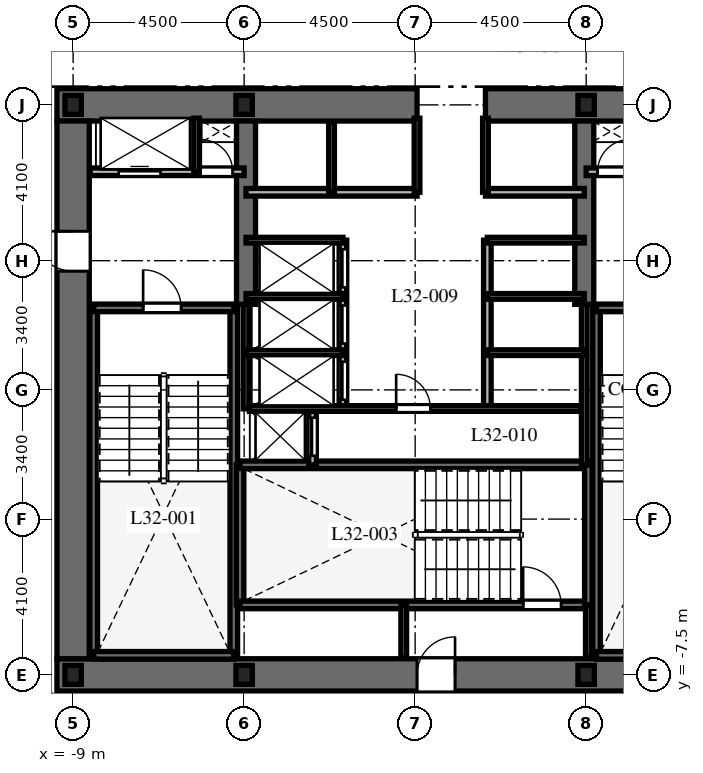
"""IFC4 building model, lengths in metres.
Left out: names, types, materials, properties, quantities, classifications, styles, units other than length and angle.
Written with IfcOpenShell. Run it as: python <this file> out.ifc"""

import sys

from ifc_helpers import new_model, si_unit, direction, frame, frame_2d, origin, origin_2d, place, context, subcontext, project, spatial, rectangle, i_section, extrude, element, fill, save


model = new_model("IFC4")
c1 = context("Model", 3, precision=1e-05, world=origin(), true_north=direction((0.0, 1.0)))
c2 = subcontext(c1, "Body", "Model", "MODEL_VIEW")
j1 = project(units=[si_unit("LENGTHUNIT", "METRE"), si_unit("PLANEANGLEUNIT", "RADIAN")], contexts=[c1])
p1 = place(None, origin())
s1 = spatial("IfcSite", under=j1, at=p1, CompositionType="ELEMENT")
p2 = place(p1, origin())
s2 = spatial("IfcBuilding", under=s1, at=p2, CompositionType="ELEMENT")
p3 = place(p2, frame((0.0, 0.0, 132.1)))
s3 = spatial("IfcBuildingStorey", under=s2, at=p3, CompositionType="ELEMENT", Elevation=132.1)
p4 = place(p3, frame((-9.425, -7.5, 0.0), z_axis=(0.0, 0.0, 1.0), x_axis=(1.0, 0.0, 0.0)))
e1 = element("IfcWall", 1, at=p4, inside=s3, PredefinedType="SHEAR", context=c2, shape_type="SweptSolid", body=[
    extrude(rectangle(XDim=18.85, YDim=0.85, at=frame_2d((9.425, 0.0))), origin(), (0.0, 0.0, 1.0), 3.7),
])
p5 = place(p4, frame((9.475, 0.0, 0.0)))
e2 = element("IfcOpeningElement", 2, at=p5, cuts=e1, PredefinedType="OPENING", context=c2, shape_type="SweptSolid", body=[
    extrude(rectangle(XDim=1.0, YDim=2.15, at=frame_2d((0.5, 1.075))), frame((0.0, 0.435, 0.0), z_axis=(0.0, -1.0, 0.0), x_axis=(1.0, 0.0, 0.0)), (0.0, 0.0, 1.0), 0.87),
])
p6 = place(p3, frame((-9.425, 7.5, 0.0), z_axis=(0.0, 0.0, 1.0), x_axis=(1.0, 0.0, 0.0)))
e3 = element("IfcWall", 3, at=p6, inside=s3, PredefinedType="SHEAR", context=c2, shape_type="SweptSolid", body=[
    extrude(rectangle(XDim=9.475, YDim=0.85, at=frame_2d((4.738, 0.0))), origin(), (0.0, 0.0, 1.0), 3.7),
])
p7 = place(p3, frame((1.85, 7.5, 0.0), z_axis=(0.0, 0.0, 1.0), x_axis=(1.0, 0.0, 0.0)))
e4 = element("IfcWall", 4, at=p7, inside=s3, PredefinedType="SHEAR", context=c2, shape_type="SweptSolid", body=[
    extrude(rectangle(XDim=7.575, YDim=0.85, at=frame_2d((3.788, 0.0))), origin(), (0.0, 0.0, 1.0), 3.7),
])
p8 = place(p3, frame((-9.0, -7.075, 0.0), z_axis=(0.0, 0.0, 1.0), x_axis=(0.0, 1.0, 0.0)))
e5 = element("IfcWall", 5, at=p8, inside=s3, PredefinedType="SHEAR", context=c2, shape_type="SweptSolid", body=[
    extrude(rectangle(XDim=14.15, YDim=0.85, at=frame_2d((7.075, 0.0))), origin(), (0.0, 0.0, 1.0), 3.7),
])
p9 = place(p8, frame((10.2, 0.0, 0.0)))
e6 = element("IfcOpeningElement", 6, at=p9, cuts=e5, PredefinedType="OPENING", context=c2, shape_type="SweptSolid", body=[
    extrude(rectangle(XDim=1.05, YDim=2.15, at=frame_2d((0.525, 1.075))), frame((0.0, 0.435, 0.0), z_axis=(0.0, -1.0, 0.0), x_axis=(1.0, 0.0, 0.0)), (0.0, 0.0, 1.0), 0.87),
])
for number, where, z_axis, x_axis in (
    (7, (-4.45, 2.25, 0.0), (0.0, 0.0, 1.0), (0.0, 1.0, 0.0)),
    (8, (4.45, 2.25, 0.0), (0.0, 0.0, 1.0), (0.0, 1.0, 0.0)),
):
    element("IfcWall", number, at=place(p3, frame(where, z_axis=z_axis, x_axis=x_axis)), inside=s3, PredefinedType="SHEAR", context=c2, shape_type="SweptSolid", body=[
        extrude(rectangle(XDim=4.825, YDim=0.5, at=frame_2d((2.413, 0.0))), origin(), (0.0, 0.0, 1.0), 3.7),
    ])
for number, where, z_axis, x_axis in (
    (9, (-8.458, -6.985, 0.0), (0.0, 0.0, 1.0), (0.0, 1.0, 0.0)),
    (10, (-4.772, -6.985, 0.0), (0.0, 0.0, 1.0), (0.0, 1.0, 0.0)),
):
    element("IfcWall", number, at=place(p3, frame(where, z_axis=z_axis, x_axis=x_axis)), inside=s3, PredefinedType="SHEAR", context=c2, shape_type="SweptSolid", body=[
        extrude(rectangle(XDim=9.143, YDim=0.2, at=frame_2d((4.572, 0.0))), origin(), (0.0, 0.0, 1.0), 3.7),
    ])
p10 = place(p3, frame((-8.458, -6.985, 0.0), z_axis=(0.0, 0.0, 1.0), x_axis=(1.0, 0.0, 0.0)))
e11 = element("IfcWall", 11, at=p10, inside=s3, PredefinedType="SHEAR", context=c2, shape_type="SweptSolid", body=[
    extrude(rectangle(XDim=3.686, YDim=0.2, at=frame_2d((1.843, 0.0))), origin(), (0.0, 0.0, 1.0), 3.7),
])
p11 = place(p3, frame((-8.458, 2.158, 0.0), z_axis=(0.0, 0.0, 1.0), x_axis=(1.0, 0.0, 0.0)))
e12 = element("IfcWall", 12, at=p11, inside=s3, PredefinedType="SHEAR", context=c2, shape_type="SweptSolid", body=[
    extrude(rectangle(XDim=3.686, YDim=0.2, at=frame_2d((1.843, 0.0))), origin(), (0.0, 0.0, 1.0), 3.7),
])
p12 = place(p11, frame((1.3, 0.0, 0.0)))
e13 = element("IfcOpeningElement", 13, at=p12, cuts=e12, PredefinedType="OPENING", context=c2, shape_type="SweptSolid", body=[
    extrude(rectangle(XDim=1.0, YDim=2.15, at=frame_2d((0.5, 1.075))), frame((0.0, 0.11, 0.0), z_axis=(0.0, -1.0, 0.0), x_axis=(1.0, 0.0, 0.0)), (0.0, 0.0, 1.0), 0.22),
])
p13 = place(p3, frame((4.772, -6.985, 0.0), z_axis=(0.0, 0.0, 1.0), x_axis=(0.0, 1.0, 0.0)))
e14 = element("IfcWall", 14, at=p13, inside=s3, PredefinedType="SHEAR", context=c2, shape_type="SweptSolid", body=[
    extrude(rectangle(XDim=9.143, YDim=0.2, at=frame_2d((4.572, 0.0))), origin(), (0.0, 0.0, 1.0), 3.7),
])
p14 = place(p3, frame((4.772, -6.985, 0.0), z_axis=(0.0, 0.0, 1.0), x_axis=(1.0, 0.0, 0.0)))
e15 = element("IfcWall", 15, at=p14, inside=s3, PredefinedType="SHEAR", context=c2, shape_type="SweptSolid", body=[
    extrude(rectangle(XDim=3.686, YDim=0.2, at=frame_2d((1.843, 0.0))), origin(), (0.0, 0.0, 1.0), 3.7),
])
p15 = place(p3, frame((4.772, 2.158, 0.0), z_axis=(0.0, 0.0, 1.0), x_axis=(1.0, 0.0, 0.0)))
e16 = element("IfcWall", 16, at=p15, inside=s3, PredefinedType="SHEAR", context=c2, shape_type="SweptSolid", body=[
    extrude(rectangle(XDim=3.686, YDim=0.2, at=frame_2d((1.843, 0.0))), origin(), (0.0, 0.0, 1.0), 3.7),
])
p16 = place(p15, frame((1.35, 0.0, 0.0)))
e17 = element("IfcOpeningElement", 17, at=p16, cuts=e16, PredefinedType="OPENING", context=c2, shape_type="SweptSolid", body=[
    extrude(rectangle(XDim=1.0, YDim=2.15, at=frame_2d((0.5, 1.075))), frame((0.0, 0.11, 0.0), z_axis=(0.0, -1.0, 0.0), x_axis=(1.0, 0.0, 0.0)), (0.0, 0.0, 1.0), 0.22),
])
p17 = place(p3, frame((-4.608, -5.658, 0.0), z_axis=(0.0, 0.0, 1.0), x_axis=(0.0, 1.0, 0.0)))
e18 = element("IfcWall", 18, at=p17, inside=s3, PredefinedType="SHEAR", context=c2, shape_type="SweptSolid", body=[
    extrude(rectangle(XDim=3.686, YDim=0.2, at=frame_2d((1.843, 0.0))), origin(), (0.0, 0.0, 1.0), 3.7),
])
p18 = place(p3, frame((-4.608, -5.658, 0.0), z_axis=(0.0, 0.0, 1.0), x_axis=(1.0, 0.0, 0.0)))
e19 = element("IfcWall", 19, at=p18, inside=s3, PredefinedType="SHEAR", context=c2, shape_type="SweptSolid", body=[
    extrude(rectangle(XDim=9.166, YDim=0.2, at=frame_2d((4.583, 0.0))), origin(), (0.0, 0.0, 1.0), 3.7),
])
p19 = place(p18, frame((7.45, 0.0, 0.0)))
e20 = element("IfcOpeningElement", 20, at=p19, cuts=e19, PredefinedType="OPENING", context=c2, shape_type="SweptSolid", body=[
    extrude(rectangle(XDim=1.0, YDim=2.15, at=frame_2d((0.5, 1.075))), frame((0.0, 0.11, 0.0), z_axis=(0.0, -1.0, 0.0), x_axis=(1.0, 0.0, 0.0)), (0.0, 0.0, 1.0), 0.22),
])
p20 = place(p3, frame((-4.608, -1.972, 0.0), z_axis=(0.0, 0.0, 1.0), x_axis=(1.0, 0.0, 0.0)))
e21 = element("IfcWall", 21, at=p20, inside=s3, PredefinedType="SHEAR", context=c2, shape_type="SweptSolid", body=[
    extrude(rectangle(XDim=9.166, YDim=0.2, at=frame_2d((4.583, 0.0))), origin(), (0.0, 0.0, 1.0), 3.7),
])
p21 = place(p3, frame((4.558, -5.658, 0.0), z_axis=(0.0, 0.0, 1.0), x_axis=(0.0, 1.0, 0.0)))
e22 = element("IfcWall", 22, at=p21, inside=s3, PredefinedType="SHEAR", context=c2, shape_type="SweptSolid", body=[
    extrude(rectangle(XDim=3.686, YDim=0.2, at=frame_2d((1.843, 0.0))), origin(), (0.0, 0.0, 1.0), 3.7),
])
for number, where, z_axis, x_axis in (
    (23, (-9.0, -7.5, 0.0), (0.0, 0.0, 1.0), (1.0, 0.0, 0.0)),
    (24, (-4.5, -7.5, 0.0), (0.0, 0.0, 1.0), (1.0, 0.0, 0.0)),
    (25, (4.5, -7.5, 0.0), (0.0, 0.0, 1.0), (1.0, 0.0, 0.0)),
    (26, (4.5, 7.5, 0.0), (0.0, 0.0, 1.0), (1.0, 0.0, 0.0)),
    (27, (-4.5, 7.5, 0.0), (0.0, 0.0, 1.0), (1.0, 0.0, 0.0)),
    (28, (-9.0, 7.5, 0.0), (0.0, 0.0, 1.0), (1.0, 0.0, 0.0)),
):
    element("IfcColumn", number, at=place(p3, frame(where, z_axis=z_axis, x_axis=x_axis)), inside=s3, PredefinedType="COLUMN", context=c2, shape_type="SweptSolid", body=[
        extrude(i_section(OverallWidth=0.432, OverallDepth=0.498, WebThickness=0.056, FlangeThickness=0.089, at=origin_2d()), origin(), (0.0, 0.0, 1.0), 3.7),
    ])
for number, where, z_axis, x_axis in (
    (29, (-0.3, -7.02, 0.0), (0.0, 0.0, 1.0), (0.0, 1.0, 0.0)),
    (30, (4.558, -7.02, 0.0), (0.0, 0.0, 1.0), (0.0, 1.0, 0.0)),
):
    element("IfcWall", number, at=place(p3, frame(where, z_axis=z_axis, x_axis=x_axis)), inside=s3, PredefinedType="PARTITIONING", context=c2, shape_type="SweptSolid", body=[
        extrude(rectangle(XDim=1.362, YDim=0.15, at=frame_2d((0.681, 0.0))), origin(), (0.0, 0.0, 1.0), 3.4),
    ])
p22 = place(p3, frame((-8.55, 5.74, 0.0), z_axis=(0.0, 0.0, 1.0), x_axis=(1.0, 0.0, 0.0)))
e31 = element("IfcWall", 31, at=p22, inside=s3, PredefinedType="PARTITIONING", context=c2, shape_type="SweptSolid", body=[
    extrude(rectangle(XDim=4.05, YDim=0.2, at=frame_2d((2.025, 0.0))), origin(), (0.0, 0.0, 1.0), 3.4),
])
p23 = place(p22, frame((0.75, 0.0, 0.0)))
e32 = element("IfcOpeningElement", 32, at=p23, cuts=e31, PredefinedType="OPENING", context=c2, shape_type="SweptSolid", body=[
    extrude(rectangle(XDim=1.1, YDim=2.2, at=frame_2d((0.55, 1.1))), frame((0.0, 0.11, 0.0), z_axis=(0.0, -1.0, 0.0), x_axis=(1.0, 0.0, 0.0)), (0.0, 0.0, 1.0), 0.22),
])
p24 = place(p22, frame((2.9, 0.0, 0.0)))
e33 = element("IfcOpeningElement", 33, at=p24, cuts=e31, PredefinedType="OPENING", context=c2, shape_type="SweptSolid", body=[
    extrude(rectangle(XDim=0.85, YDim=2.03, at=frame_2d((0.425, 1.015))), frame((0.0, 0.11, 0.0), z_axis=(0.0, -1.0, 0.0), x_axis=(1.0, 0.0, 0.0)), (0.0, 0.0, 1.0), 0.22),
])
p25 = place(p3, frame((-5.75, 5.74, 0.0), z_axis=(0.0, 0.0, 1.0), x_axis=(0.0, 1.0, 0.0)))
e34 = element("IfcWall", 34, at=p25, inside=s3, PredefinedType="PARTITIONING", context=c2, shape_type="SweptSolid", body=[
    extrude(rectangle(XDim=1.41, YDim=0.15, at=frame_2d((0.705, 0.0))), origin(), (0.0, 0.0, 1.0), 3.4),
])
p26 = place(p3, frame((4.5, 5.74, 0.0), z_axis=(0.0, 0.0, 1.0), x_axis=(1.0, 0.0, 0.0)))
e35 = element("IfcWall", 35, at=p26, inside=s3, PredefinedType="PARTITIONING", context=c2, shape_type="SweptSolid", body=[
    extrude(rectangle(XDim=4.05, YDim=0.2, at=frame_2d((2.025, 0.0))), origin(), (0.0, 0.0, 1.0), 3.4),
])
p27 = place(p26, frame((0.3, 0.0, 0.0)))
e36 = element("IfcOpeningElement", 36, at=p27, cuts=e35, PredefinedType="OPENING", context=c2, shape_type="SweptSolid", body=[
    extrude(rectangle(XDim=0.85, YDim=2.03, at=frame_2d((0.425, 1.015))), frame((0.0, 0.11, 0.0), z_axis=(0.0, -1.0, 0.0), x_axis=(1.0, 0.0, 0.0)), (0.0, 0.0, 1.0), 0.22),
])
p28 = place(p26, frame((2.15, 0.0, 0.0)))
e37 = element("IfcOpeningElement", 37, at=p28, cuts=e35, PredefinedType="OPENING", context=c2, shape_type="SweptSolid", body=[
    extrude(rectangle(XDim=1.1, YDim=2.2, at=frame_2d((0.55, 1.1))), frame((0.0, 0.11, 0.0), z_axis=(0.0, -1.0, 0.0), x_axis=(1.0, 0.0, 0.0)), (0.0, 0.0, 1.0), 0.22),
])
p29 = place(p3, frame((-2.7, -1.972, 0.0), z_axis=(0.0, 0.0, 1.0), x_axis=(0.0, 1.0, 0.0)))
e38 = element("IfcWall", 38, at=p29, inside=s3, PredefinedType="PARTITIONING", context=c2, shape_type="SweptSolid", body=[
    extrude(rectangle(XDim=1.472, YDim=0.2, at=frame_2d((0.736, 0.0))), origin(), (0.0, 0.0, 1.0), 3.4),
])
p30 = place(p29, frame((0.24, 0.0, 0.0)))
e39 = element("IfcOpeningElement", 39, at=p30, cuts=e38, PredefinedType="OPENING", context=c2, shape_type="SweptSolid", body=[
    extrude(rectangle(XDim=1.0, YDim=2.2, at=frame_2d((0.5, 1.1))), frame((0.0, 0.11, 0.0), z_axis=(0.0, -1.0, 0.0), x_axis=(1.0, 0.0, 0.0)), (0.0, 0.0, 1.0), 0.22),
])
p31 = place(p3, frame((-4.45, 5.2, 0.0), z_axis=(0.0, 0.0, 1.0), x_axis=(1.0, 0.0, 0.0)))
e40 = element("IfcWall", 40, at=p31, inside=s3, PredefinedType="PARTITIONING", context=c2, shape_type="SweptSolid", body=[
    extrude(rectangle(XDim=4.5, YDim=0.2, at=frame_2d((2.25, 0.0))), origin(), (0.0, 0.0, 1.0), 3.4),
])
p32 = place(p3, frame((1.85, 5.2, 0.0), z_axis=(0.0, 0.0, 1.0), x_axis=(1.0, 0.0, 0.0)))
e41 = element("IfcWall", 41, at=p32, inside=s3, PredefinedType="PARTITIONING", context=c2, shape_type="SweptSolid", body=[
    extrude(rectangle(XDim=2.6, YDim=0.2, at=frame_2d((1.3, 0.0))), origin(), (0.0, 0.0, 1.0), 3.4),
])
p33 = place(p3, frame((-2.2, 5.2, 0.0), z_axis=(0.0, 0.0, 1.0), x_axis=(0.0, 1.0, 0.0)))
e42 = element("IfcWall", 42, at=p33, inside=s3, PredefinedType="PARTITIONING", context=c2, shape_type="SweptSolid", body=[
    extrude(rectangle(XDim=1.85, YDim=0.15, at=frame_2d((0.925, 0.0))), origin(), (0.0, 0.0, 1.0), 3.4),
])
for number, where, z_axis, x_axis in (
    (43, (0.05, 5.2, 0.0), (0.0, 0.0, 1.0), (0.0, 1.0, 0.0)),
    (44, (1.85, 5.2, 0.0), (0.0, 0.0, 1.0), (0.0, 1.0, 0.0)),
):
    element("IfcWall", number, at=place(p3, frame(where, z_axis=z_axis, x_axis=x_axis)), inside=s3, PredefinedType="PARTITIONING", context=c2, shape_type="SweptSolid", body=[
        extrude(rectangle(XDim=1.95, YDim=0.15, at=frame_2d((0.975, 0.0))), origin(), (0.0, 0.0, 1.0), 3.4),
    ])
p34 = place(p3, frame((-4.45, -0.5, 0.0), z_axis=(0.0, 0.0, 1.0), x_axis=(0.0, 1.0, 0.0)))
e45 = element("IfcWall", 45, at=p34, inside=s3, PredefinedType="PARTITIONING", context=c2, shape_type="SweptSolid", body=[
    extrude(rectangle(XDim=2.75, YDim=0.15, at=frame_2d((1.375, 0.0))), origin(), (0.0, 0.0, 1.0), 3.4),
])
p35 = place(p3, frame((4.45, -1.972, 0.0), z_axis=(0.0, 0.0, 1.0), x_axis=(0.0, 1.0, 0.0)))
e46 = element("IfcWall", 46, at=p35, inside=s3, PredefinedType="PARTITIONING", context=c2, shape_type="SweptSolid", body=[
    extrude(rectangle(XDim=4.222, YDim=0.15, at=frame_2d((2.111, 0.0))), origin(), (0.0, 0.0, 1.0), 3.4),
])
p36 = place(p3, frame((-1.9, -0.5, 0.0), z_axis=(0.0, 0.0, 1.0), x_axis=(0.0, 1.0, 0.0)))
e47 = element("IfcWall", 47, at=p36, inside=s3, PredefinedType="PARTITIONING", context=c2, shape_type="SweptSolid", body=[
    extrude(rectangle(XDim=4.44, YDim=0.2, at=frame_2d((2.22, 0.0))), origin(), (0.0, 0.0, 1.0), 3.4),
])
p37 = place(p36, frame((0.24, 0.0, 0.0)))
e48 = element("IfcOpeningElement", 48, at=p37, cuts=e47, PredefinedType="OPENING", context=c2, shape_type="SweptSolid", body=[
    extrude(rectangle(XDim=1.0, YDim=2.2, at=frame_2d((0.5, 1.1))), frame((0.0, 0.11, 0.0), z_axis=(0.0, -1.0, 0.0), x_axis=(1.0, 0.0, 0.0)), (0.0, 0.0, 1.0), 0.22),
])
p38 = place(p36, frame((1.72, 0.0, 0.0)))
e49 = element("IfcOpeningElement", 49, at=p38, cuts=e47, PredefinedType="OPENING", context=c2, shape_type="SweptSolid", body=[
    extrude(rectangle(XDim=1.0, YDim=2.2, at=frame_2d((0.5, 1.1))), frame((0.0, 0.11, 0.0), z_axis=(0.0, -1.0, 0.0), x_axis=(1.0, 0.0, 0.0)), (0.0, 0.0, 1.0), 0.22),
])
p39 = place(p36, frame((3.2, 0.0, 0.0)))
e50 = element("IfcOpeningElement", 50, at=p39, cuts=e47, PredefinedType="OPENING", context=c2, shape_type="SweptSolid", body=[
    extrude(rectangle(XDim=1.0, YDim=2.2, at=frame_2d((0.5, 1.1))), frame((0.0, 0.11, 0.0), z_axis=(0.0, -1.0, 0.0), x_axis=(1.0, 0.0, 0.0)), (0.0, 0.0, 1.0), 0.22),
])
for number, where, z_axis, x_axis in (
    (51, (-4.45, 3.94, 0.0), (0.0, 0.0, 1.0), (1.0, 0.0, 0.0)),
    (52, (-4.45, 0.98, 0.0), (0.0, 0.0, 1.0), (1.0, 0.0, 0.0)),
    (53, (-4.45, 2.46, 0.0), (0.0, 0.0, 1.0), (1.0, 0.0, 0.0)),
):
    element("IfcWall", number, at=place(p3, frame(where, z_axis=z_axis, x_axis=x_axis)), inside=s3, PredefinedType="PARTITIONING", context=c2, shape_type="SweptSolid", body=[
        extrude(rectangle(XDim=2.55, YDim=0.15, at=frame_2d((1.275, 0.0))), origin(), (0.0, 0.0, 1.0), 3.4),
    ])
p40 = place(p3, frame((1.9, -0.5, 0.0), z_axis=(0.0, 0.0, 1.0), x_axis=(0.0, 1.0, 0.0)))
e54 = element("IfcWall", 54, at=p40, inside=s3, PredefinedType="PARTITIONING", context=c2, shape_type="SweptSolid", body=[
    extrude(rectangle(XDim=4.44, YDim=0.2, at=frame_2d((2.22, 0.0))), origin(), (0.0, 0.0, 1.0), 3.4),
])
for number, where, z_axis, x_axis in (
    (55, (1.9, 3.94, 0.0), (0.0, 0.0, 1.0), (1.0, 0.0, 0.0)),
    (56, (1.9, 0.98, 0.0), (0.0, 0.0, 1.0), (1.0, 0.0, 0.0)),
    (57, (1.9, 2.46, 0.0), (0.0, 0.0, 1.0), (1.0, 0.0, 0.0)),
):
    element("IfcWall", number, at=place(p3, frame(where, z_axis=z_axis, x_axis=x_axis)), inside=s3, PredefinedType="PARTITIONING", context=c2, shape_type="SweptSolid", body=[
        extrude(rectangle(XDim=2.55, YDim=0.15, at=frame_2d((1.275, 0.0))), origin(), (0.0, 0.0, 1.0), 3.4),
    ])
p41 = place(p3, frame((-4.36, -0.49, 0.0), z_axis=(0.0, 0.0, 1.0), x_axis=(1.0, 0.0, 0.0)))
e58 = element("IfcWall", 58, at=p41, inside=s3, PredefinedType="PARTITIONING", context=c2, shape_type="SweptSolid", body=[
    extrude(rectangle(XDim=8.72, YDim=0.15, at=frame_2d((4.36, 0.0))), origin(), (0.0, 0.0, 1.0), 3.4),
])
p42 = place(p41, frame((3.86, 0.0, 0.0)))
e59 = element("IfcOpeningElement", 59, at=p42, cuts=e58, PredefinedType="OPENING", context=c2, shape_type="SweptSolid", body=[
    extrude(rectangle(XDim=0.9, YDim=2.03, at=frame_2d((0.45, 1.015))), frame((0.0, 0.085, 0.0), z_axis=(0.0, -1.0, 0.0), x_axis=(1.0, 0.0, 0.0)), (0.0, 0.0, 1.0), 0.17),
])
p43 = place(p12, origin())
e60 = element("IfcDoor", 60, at=p43, inside=s3, OperationType="SINGLE_SWING_LEFT", PredefinedType="DOOR", context=c2, shape_type="SweptSolid", body=[
    extrude(rectangle(XDim=1.0, YDim=2.15, at=frame_2d((0.5, 1.075))), frame((0.0, 0.025, 0.0), z_axis=(0.0, -1.0, 0.0), x_axis=(1.0, 0.0, 0.0)), (0.0, 0.0, 1.0), 0.05),
])
fill(e13, e60)
p44 = place(p19, origin())
e61 = element("IfcDoor", 61, at=p44, inside=s3, OperationType="SINGLE_SWING_LEFT", PredefinedType="DOOR", context=c2, shape_type="SweptSolid", body=[
    extrude(rectangle(XDim=1.0, YDim=2.15, at=frame_2d((0.5, 1.075))), frame((0.0, 0.025, 0.0), z_axis=(0.0, -1.0, 0.0), x_axis=(1.0, 0.0, 0.0)), (0.0, 0.0, 1.0), 0.05),
])
fill(e20, e61)
p45 = place(p5, origin())
e62 = element("IfcDoor", 62, at=p45, inside=s3, OperationType="SINGLE_SWING_RIGHT", PredefinedType="DOOR", context=c2, shape_type="SweptSolid", body=[
    extrude(rectangle(XDim=1.0, YDim=2.15, at=frame_2d((0.5, 1.075))), frame((0.0, 0.025, 0.0), z_axis=(0.0, -1.0, 0.0), x_axis=(1.0, 0.0, 0.0)), (0.0, 0.0, 1.0), 0.05),
])
fill(e2, e62)
p46 = place(p9, origin())
e63 = element("IfcDoor", 63, at=p46, inside=s3, OperationType="SINGLE_SWING_RIGHT", PredefinedType="DOOR", context=c2, shape_type="SweptSolid", body=[
    extrude(rectangle(XDim=1.05, YDim=2.15, at=frame_2d((0.525, 1.075))), frame((0.0, 0.025, 0.0), z_axis=(0.0, -1.0, 0.0), x_axis=(1.0, 0.0, 0.0)), (0.0, 0.0, 1.0), 0.05),
])
fill(e6, e63)
p47 = place(p23, origin())
e64 = element("IfcDoor", 64, at=p47, inside=s3, OperationType="SLIDING_TO_LEFT", PredefinedType="DOOR", context=c2, shape_type="SweptSolid", body=[
    extrude(rectangle(XDim=1.1, YDim=2.2, at=frame_2d((0.55, 1.1))), frame((0.0, 0.025, 0.0), z_axis=(0.0, -1.0, 0.0), x_axis=(1.0, 0.0, 0.0)), (0.0, 0.0, 1.0), 0.05),
])
fill(e32, e64)
p48 = place(p24, origin())
e65 = element("IfcDoor", 65, at=p48, inside=s3, OperationType="SINGLE_SWING_LEFT", PredefinedType="DOOR", context=c2, shape_type="SweptSolid", body=[
    extrude(rectangle(XDim=0.85, YDim=2.03, at=frame_2d((0.425, 1.015))), frame((0.0, 0.025, 0.0), z_axis=(0.0, -1.0, 0.0), x_axis=(1.0, 0.0, 0.0)), (0.0, 0.0, 1.0), 0.05),
])
fill(e33, e65)
p49 = place(p27, origin())
e66 = element("IfcDoor", 66, at=p49, inside=s3, OperationType="SINGLE_SWING_RIGHT", PredefinedType="DOOR", context=c2, shape_type="SweptSolid", body=[
    extrude(rectangle(XDim=0.85, YDim=2.03, at=frame_2d((0.425, 1.015))), frame((0.0, 0.025, 0.0), z_axis=(0.0, -1.0, 0.0), x_axis=(1.0, 0.0, 0.0)), (0.0, 0.0, 1.0), 0.05),
])
fill(e36, e66)
p50 = place(p30, origin())
e67 = element("IfcDoor", 67, at=p50, inside=s3, OperationType="SLIDING_TO_LEFT", PredefinedType="DOOR", context=c2, shape_type="SweptSolid", body=[
    extrude(rectangle(XDim=1.0, YDim=2.2, at=frame_2d((0.5, 1.1))), frame((0.0, 0.025, 0.0), z_axis=(0.0, -1.0, 0.0), x_axis=(1.0, 0.0, 0.0)), (0.0, 0.0, 1.0), 0.05),
])
fill(e39, e67)
p51 = place(p37, origin())
e68 = element("IfcDoor", 68, at=p51, inside=s3, OperationType="SLIDING_TO_LEFT", PredefinedType="DOOR", context=c2, shape_type="SweptSolid", body=[
    extrude(rectangle(XDim=1.0, YDim=2.2, at=frame_2d((0.5, 1.1))), frame((0.0, 0.025, 0.0), z_axis=(0.0, -1.0, 0.0), x_axis=(1.0, 0.0, 0.0)), (0.0, 0.0, 1.0), 0.05),
])
fill(e48, e68)
p52 = place(p38, origin())
e69 = element("IfcDoor", 69, at=p52, inside=s3, OperationType="SLIDING_TO_LEFT", PredefinedType="DOOR", context=c2, shape_type="SweptSolid", body=[
    extrude(rectangle(XDim=1.0, YDim=2.2, at=frame_2d((0.5, 1.1))), frame((0.0, 0.025, 0.0), z_axis=(0.0, -1.0, 0.0), x_axis=(1.0, 0.0, 0.0)), (0.0, 0.0, 1.0), 0.05),
])
fill(e49, e69)
p53 = place(p39, origin())
e70 = element("IfcDoor", 70, at=p53, inside=s3, OperationType="SLIDING_TO_LEFT", PredefinedType="DOOR", context=c2, shape_type="SweptSolid", body=[
    extrude(rectangle(XDim=1.0, YDim=2.2, at=frame_2d((0.5, 1.1))), frame((0.0, 0.025, 0.0), z_axis=(0.0, -1.0, 0.0), x_axis=(1.0, 0.0, 0.0)), (0.0, 0.0, 1.0), 0.05),
])
fill(e50, e70)
p54 = place(p42, origin())
e71 = element("IfcDoor", 71, at=p54, inside=s3, OperationType="SINGLE_SWING_LEFT", PredefinedType="DOOR", context=c2, shape_type="SweptSolid", body=[
    extrude(rectangle(XDim=0.9, YDim=2.03, at=frame_2d((0.45, 1.015))), frame((0.0, 0.025, 0.0), z_axis=(0.0, -1.0, 0.0), x_axis=(1.0, 0.0, 0.0)), (0.0, 0.0, 1.0), 0.05),
])
fill(e59, e71)
save(model, sys.argv[1])
